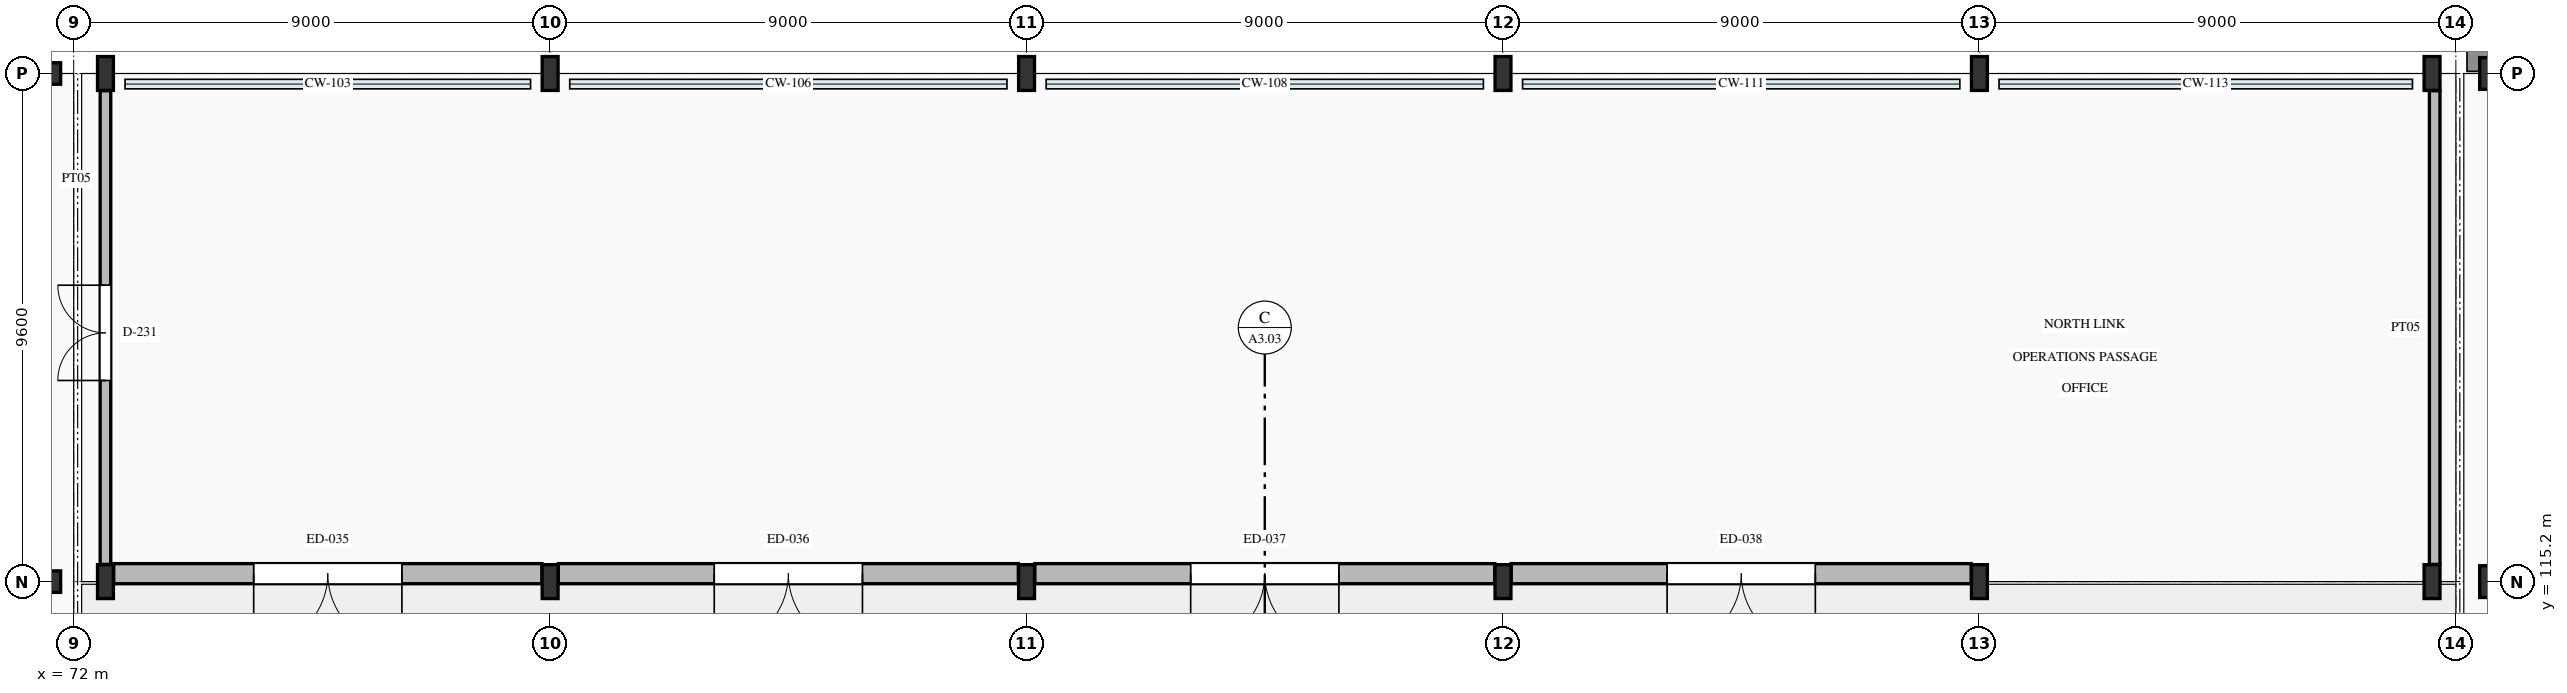
"""IFC4 building model, lengths in metres.
Left out: names, types, materials, properties, quantities, classifications, styles, units other than length and angle.
Written with IfcOpenShell. Run it as: python <this file> out.ifc"""

import sys

from ifc_helpers import new_model, si_unit, direction, frame, frame_2d, origin, origin_2d, place, context, subcontext, project, spatial, rectangle, hollow_circle, i_section, extrude, element, fill, save


model = new_model("IFC4")
c1 = context("Model", 3, precision=1e-05, world=origin(), true_north=direction((0.0, 1.0)))
c2 = subcontext(c1, "Body", "Model", "MODEL_VIEW")
j1 = project(units=[si_unit("LENGTHUNIT", "METRE"), si_unit("PLANEANGLEUNIT", "RADIAN")], contexts=[c1])
p1 = place(None, origin())
s1 = spatial("IfcSite", under=j1, at=p1, CompositionType="ELEMENT")
p2 = place(p1, origin())
s2 = spatial("IfcBuilding", under=s1, at=p2, CompositionType="ELEMENT")
p3 = place(p2, origin())
s3 = spatial("IfcBuildingStorey", under=s2, at=p3, CompositionType="ELEMENT", Elevation=0.0)
for number, where, z_axis, x_axis in (
    (1, (71.55, 115.2, 0.0), (0.0, 0.0, 1.0), (1.0, 0.0, 0.0)),
    (2, (71.55, 124.8, 0.0), (0.0, 0.0, 1.0), (1.0, 0.0, 0.0)),
):
    element("IfcColumn", number, at=place(p3, frame(where, z_axis=z_axis, x_axis=x_axis)), inside=s3, PredefinedType="COLUMN", context=c2, shape_type="SweptSolid", body=[
        extrude(hollow_circle(Radius=0.203, WallThickness=0.02, at=origin_2d()), origin(), (0.0, 0.0, 1.0), 6.0),
    ])
for number, where, z_axis, x_axis in (
    (3, (72.6, 115.2, 0.0), (0.0, 0.0, 1.0), (1.0, 0.0, 0.0)),
    (4, (72.6, 124.8, 0.0), (0.0, 0.0, 1.0), (1.0, 0.0, 0.0)),
    (5, (81.0, 115.2, 0.0), (0.0, 0.0, 1.0), (1.0, 0.0, 0.0)),
    (6, (81.0, 124.8, 0.0), (0.0, 0.0, 1.0), (1.0, 0.0, 0.0)),
    (7, (90.0, 115.2, 0.0), (0.0, 0.0, 1.0), (1.0, 0.0, 0.0)),
    (8, (90.0, 124.8, 0.0), (0.0, 0.0, 1.0), (1.0, 0.0, 0.0)),
    (9, (99.0, 115.2, 0.0), (0.0, 0.0, 1.0), (1.0, 0.0, 0.0)),
    (10, (99.0, 124.8, 0.0), (0.0, 0.0, 1.0), (1.0, 0.0, 0.0)),
    (11, (108.0, 115.2, 0.0), (0.0, 0.0, 1.0), (1.0, 0.0, 0.0)),
    (12, (108.0, 124.8, 0.0), (0.0, 0.0, 1.0), (1.0, 0.0, 0.0)),
    (13, (116.55, 115.2, 0.0), (0.0, 0.0, 1.0), (1.0, 0.0, 0.0)),
    (14, (116.55, 124.8, 0.0), (0.0, 0.0, 1.0), (1.0, 0.0, 0.0)),
):
    element("IfcColumn", number, at=place(p3, frame(where, z_axis=z_axis, x_axis=x_axis)), inside=s3, PredefinedType="COLUMN", context=c2, shape_type="SweptSolid", body=[
        extrude(i_section(OverallWidth=0.3, OverallDepth=0.64, WebThickness=0.013, FlangeThickness=0.026, FilletRadius=0.027, at=origin_2d()), origin(), (0.0, 0.0, 1.0), 6.0),
    ])
for number, where, z_axis, x_axis in (
    (15, (117.6, 115.2, 0.0), (0.0, 0.0, 1.0), (1.0, 0.0, 0.0)),
    (16, (117.6, 124.8, 0.0), (0.0, 0.0, 1.0), (1.0, 0.0, 0.0)),
):
    element("IfcColumn", number, at=place(p3, frame(where, z_axis=z_axis, x_axis=x_axis)), inside=s3, PredefinedType="COLUMN", context=c2, shape_type="SweptSolid", body=[
        extrude(i_section(OverallWidth=0.3, OverallDepth=0.6, WebThickness=0.015, FlangeThickness=0.03, FilletRadius=0.027, at=origin_2d()), origin(), (0.0, 0.0, 1.0), 6.0),
    ])
p4 = place(p3, frame((72.755, 115.35, 0.0), z_axis=(0.0, 0.0, 1.0), x_axis=(1.0, 0.0, 0.0)))
e17 = element("IfcWall", 17, at=p4, inside=s3, PredefinedType="SOLIDWALL", context=c2, shape_type="SweptSolid", body=[
    extrude(rectangle(XDim=8.09, YDim=0.38, at=frame_2d((4.045, 0.0))), origin(), (0.0, 0.0, 1.0), 5.435),
])
p5 = place(p4, frame((2.645, 0.0, 0.0)))
e18 = element("IfcOpeningElement", 18, at=p5, cuts=e17, PredefinedType="OPENING", context=c2, shape_type="SweptSolid", body=[
    extrude(rectangle(XDim=2.8, YDim=2.8, at=frame_2d((1.4, 1.4))), frame((0.0, 0.205, 0.0), z_axis=(0.0, -1.0, 0.0), x_axis=(1.0, 0.0, 0.0)), (0.0, 0.0, 1.0), 0.41),
])
p6 = place(p3, frame((81.155, 115.35, 0.0), z_axis=(0.0, 0.0, 1.0), x_axis=(1.0, 0.0, 0.0)))
e19 = element("IfcWall", 19, at=p6, inside=s3, PredefinedType="SOLIDWALL", context=c2, shape_type="SweptSolid", body=[
    extrude(rectangle(XDim=8.69, YDim=0.38, at=frame_2d((4.345, 0.0))), origin(), (0.0, 0.0, 1.0), 5.435),
])
p7 = place(p6, frame((2.945, 0.0, 0.0)))
e20 = element("IfcOpeningElement", 20, at=p7, cuts=e19, PredefinedType="OPENING", context=c2, shape_type="SweptSolid", body=[
    extrude(rectangle(XDim=2.8, YDim=2.8, at=frame_2d((1.4, 1.4))), frame((0.0, 0.205, 0.0), z_axis=(0.0, -1.0, 0.0), x_axis=(1.0, 0.0, 0.0)), (0.0, 0.0, 1.0), 0.41),
])
p8 = place(p3, frame((90.155, 115.35, 0.0), z_axis=(0.0, 0.0, 1.0), x_axis=(1.0, 0.0, 0.0)))
e21 = element("IfcWall", 21, at=p8, inside=s3, PredefinedType="SOLIDWALL", context=c2, shape_type="SweptSolid", body=[
    extrude(rectangle(XDim=8.69, YDim=0.38, at=frame_2d((4.345, 0.0))), origin(), (0.0, 0.0, 1.0), 5.435),
])
p9 = place(p8, frame((2.945, 0.0, 0.0)))
e22 = element("IfcOpeningElement", 22, at=p9, cuts=e21, PredefinedType="OPENING", context=c2, shape_type="SweptSolid", body=[
    extrude(rectangle(XDim=2.8, YDim=2.8, at=frame_2d((1.4, 1.4))), frame((0.0, 0.205, 0.0), z_axis=(0.0, -1.0, 0.0), x_axis=(1.0, 0.0, 0.0)), (0.0, 0.0, 1.0), 0.41),
])
p10 = place(p3, frame((99.155, 115.35, 0.0), z_axis=(0.0, 0.0, 1.0), x_axis=(1.0, 0.0, 0.0)))
e23 = element("IfcWall", 23, at=p10, inside=s3, PredefinedType="SOLIDWALL", context=c2, shape_type="SweptSolid", body=[
    extrude(rectangle(XDim=8.69, YDim=0.38, at=frame_2d((4.345, 0.0))), origin(), (0.0, 0.0, 1.0), 5.435),
])
p11 = place(p10, frame((2.945, 0.0, 0.0)))
e24 = element("IfcOpeningElement", 24, at=p11, cuts=e23, PredefinedType="OPENING", context=c2, shape_type="SweptSolid", body=[
    extrude(rectangle(XDim=2.8, YDim=2.8, at=frame_2d((1.4, 1.4))), frame((0.0, 0.205, 0.0), z_axis=(0.0, -1.0, 0.0), x_axis=(1.0, 0.0, 0.0)), (0.0, 0.0, 1.0), 0.41),
])
p12 = place(p3, frame((72.6, 115.525, 0.0), z_axis=(0.0, 0.0, 1.0), x_axis=(0.0, 1.0, 0.0)))
e25 = element("IfcWall", 25, at=p12, inside=s3, PredefinedType="PARTITIONING", context=c2, shape_type="SweptSolid", body=[
    extrude(rectangle(XDim=8.95, YDim=0.2, at=frame_2d((4.475, 0.0))), origin(), (0.0, 0.0, 1.0), 5.185),
])
p13 = place(p12, frame((3.475, 0.0, 0.0)))
e26 = element("IfcOpeningElement", 26, at=p13, cuts=e25, PredefinedType="OPENING", context=c2, shape_type="SweptSolid", body=[
    extrude(rectangle(XDim=1.8, YDim=2.3, at=frame_2d((0.9, 1.15))), frame((0.0, 0.115, 0.0), z_axis=(0.0, -1.0, 0.0), x_axis=(1.0, 0.0, 0.0)), (0.0, 0.0, 1.0), 0.23),
])
p14 = place(p3, frame((116.6, 115.525, 0.0), z_axis=(0.0, 0.0, 1.0), x_axis=(0.0, 1.0, 0.0)))
e27 = element("IfcWall", 27, at=p14, inside=s3, PredefinedType="PARTITIONING", context=c2, shape_type="SweptSolid", body=[
    extrude(rectangle(XDim=8.95, YDim=0.2, at=frame_2d((4.475, 0.0))), origin(), (0.0, 0.0, 1.0), 5.405),
])
p15 = place(p5, frame((2.8, 0.0, 0.0), z_axis=(0.0, 0.0, 1.0), x_axis=(-1.0, 0.0, 0.0)))
e28 = element("IfcDoor", 28, at=p15, inside=s3, OperationType="DOUBLE_DOOR_SINGLE_SWING", PredefinedType="DOOR", context=c2, shape_type="SweptSolid", body=[
    extrude(rectangle(XDim=2.8, YDim=2.8, at=frame_2d((1.4, 1.4))), frame((0.0, 0.025, 0.0), z_axis=(0.0, -1.0, 0.0), x_axis=(1.0, 0.0, 0.0)), (0.0, 0.0, 1.0), 0.05),
])
fill(e18, e28)
p16 = place(p7, frame((2.8, 0.0, 0.0), z_axis=(0.0, 0.0, 1.0), x_axis=(-1.0, 0.0, 0.0)))
e29 = element("IfcDoor", 29, at=p16, inside=s3, OperationType="DOUBLE_DOOR_SINGLE_SWING", PredefinedType="DOOR", context=c2, shape_type="SweptSolid", body=[
    extrude(rectangle(XDim=2.8, YDim=2.8, at=frame_2d((1.4, 1.4))), frame((0.0, 0.025, 0.0), z_axis=(0.0, -1.0, 0.0), x_axis=(1.0, 0.0, 0.0)), (0.0, 0.0, 1.0), 0.05),
])
fill(e20, e29)
p17 = place(p9, frame((2.8, 0.0, 0.0), z_axis=(0.0, 0.0, 1.0), x_axis=(-1.0, 0.0, 0.0)))
e30 = element("IfcDoor", 30, at=p17, inside=s3, OperationType="DOUBLE_DOOR_SINGLE_SWING", PredefinedType="DOOR", context=c2, shape_type="SweptSolid", body=[
    extrude(rectangle(XDim=2.8, YDim=2.8, at=frame_2d((1.4, 1.4))), frame((0.0, 0.025, 0.0), z_axis=(0.0, -1.0, 0.0), x_axis=(1.0, 0.0, 0.0)), (0.0, 0.0, 1.0), 0.05),
])
fill(e22, e30)
p18 = place(p11, frame((2.8, 0.0, 0.0), z_axis=(0.0, 0.0, 1.0), x_axis=(-1.0, 0.0, 0.0)))
e31 = element("IfcDoor", 31, at=p18, inside=s3, OperationType="DOUBLE_DOOR_SINGLE_SWING", PredefinedType="DOOR", context=c2, shape_type="SweptSolid", body=[
    extrude(rectangle(XDim=2.8, YDim=2.8, at=frame_2d((1.4, 1.4))), frame((0.0, 0.025, 0.0), z_axis=(0.0, -1.0, 0.0), x_axis=(1.0, 0.0, 0.0)), (0.0, 0.0, 1.0), 0.05),
])
fill(e24, e31)
p19 = place(p13, origin())
e32 = element("IfcDoor", 32, at=p19, inside=s3, OperationType="DOUBLE_DOOR_SINGLE_SWING", PredefinedType="DOOR", context=c2, shape_type="SweptSolid", body=[
    extrude(rectangle(XDim=1.8, YDim=2.3, at=frame_2d((0.9, 1.15))), frame((0.0, 0.025, 0.0), z_axis=(0.0, -1.0, 0.0), x_axis=(1.0, 0.0, 0.0)), (0.0, 0.0, 1.0), 0.05),
])
fill(e26, e32)
save(model, sys.argv[1])
